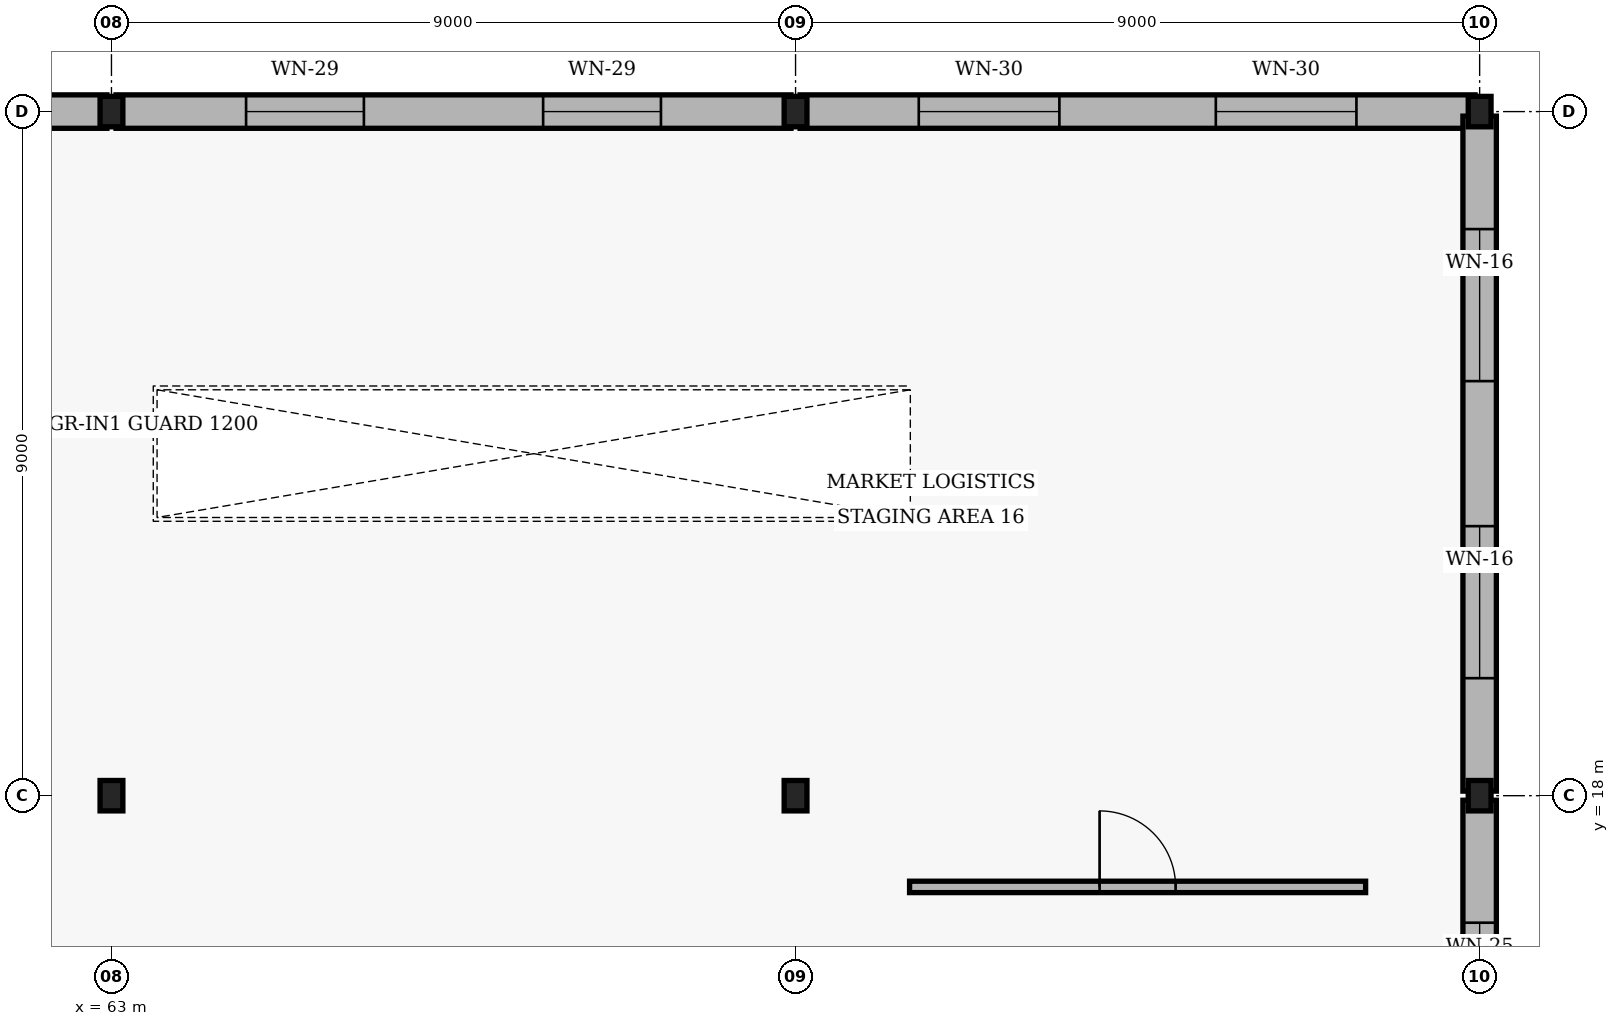
"""IFC4 building model, lengths in metres.
Left out: names, types, materials, properties, quantities, classifications, styles, units other than length and angle.
Written with IfcOpenShell. Run it as: python <this file> out.ifc"""

import sys

from ifc_helpers import new_model, si_unit, direction, frame, frame_2d, origin, origin_2d, place, context, subcontext, project, spatial, rectangle, i_section, extrude, element, fill, save


model = new_model("IFC4")
c1 = context("Model", 3, precision=1e-05, world=origin(), true_north=direction((0.0, 1.0)))
c2 = subcontext(c1, "Body", "Model", "MODEL_VIEW")
j1 = project(units=[si_unit("LENGTHUNIT", "METRE"), si_unit("PLANEANGLEUNIT", "RADIAN")], contexts=[c1])
p1 = place(None, origin())
s1 = spatial("IfcSite", under=j1, at=p1, CompositionType="ELEMENT")
p2 = place(p1, origin())
s2 = spatial("IfcBuilding", under=s1, at=p2, CompositionType="ELEMENT")
p3 = place(p2, frame((0.0, 0.0, 5.4)))
s3 = spatial("IfcBuildingStorey", under=s2, at=p3, CompositionType="ELEMENT", Elevation=5.4)
for number, where, z_axis, x_axis in (
    (1, (63.0, 18.0, 0.0), (0.0, 0.0, 1.0), (1.0, 0.0, 0.0)),
    (2, (63.0, 27.0, 0.0), (0.0, 0.0, 1.0), (1.0, 0.0, 0.0)),
    (3, (72.0, 18.0, 0.0), (0.0, 0.0, 1.0), (1.0, 0.0, 0.0)),
    (4, (72.0, 27.0, 0.0), (0.0, 0.0, 1.0), (1.0, 0.0, 0.0)),
    (5, (81.0, 18.0, 0.0), (0.0, 0.0, 1.0), (1.0, 0.0, 0.0)),
    (6, (81.0, 27.0, 0.0), (0.0, 0.0, 1.0), (1.0, 0.0, 0.0)),
):
    element("IfcColumn", number, at=place(p3, frame(where, z_axis=z_axis, x_axis=x_axis)), inside=s3, PredefinedType="COLUMN", context=c2, shape_type="SweptSolid", body=[
        extrude(i_section(OverallWidth=0.3, OverallDepth=0.4, WebThickness=0.013, FlangeThickness=0.024, FilletRadius=0.027, at=origin_2d()), origin(), (0.0, 0.0, 1.0), 4.2),
    ])
p4 = place(p3, frame((54.06, 27.0, 0.0), z_axis=(0.0, 0.0, 1.0), x_axis=(1.0, 0.0, 0.0)))
e7 = element("IfcWall", 7, at=p4, inside=s3, PredefinedType="SOLIDWALL", context=c2, shape_type="SweptSolid", body=[
    extrude(rectangle(XDim=8.88, YDim=0.44, at=frame_2d((4.44, 0.0))), origin(), (0.0, 0.0, 1.0), 3.5),
])
p5 = place(p4, frame((1.286, 0.0, 0.9)))
e8 = element("IfcOpeningElement", 8, at=p5, cuts=e7, PredefinedType="OPENING", context=c2, shape_type="SweptSolid", body=[
    extrude(rectangle(XDim=2.4, YDim=2.1, at=frame_2d((1.2, 1.05))), frame((0.0, 0.23, 0.0), z_axis=(0.0, -1.0, 0.0), x_axis=(1.0, 0.0, 0.0)), (0.0, 0.0, 1.0), 0.46),
])
p6 = place(p4, frame((5.194, 0.0, 0.9)))
e9 = element("IfcOpeningElement", 9, at=p6, cuts=e7, PredefinedType="OPENING", context=c2, shape_type="SweptSolid", body=[
    extrude(rectangle(XDim=2.4, YDim=2.1, at=frame_2d((1.2, 1.05))), frame((0.0, 0.23, 0.0), z_axis=(0.0, -1.0, 0.0), x_axis=(1.0, 0.0, 0.0)), (0.0, 0.0, 1.0), 0.46),
])
p7 = place(p3, frame((63.06, 27.0, 0.0), z_axis=(0.0, 0.0, 1.0), x_axis=(1.0, 0.0, 0.0)))
e10 = element("IfcWall", 10, at=p7, inside=s3, PredefinedType="SOLIDWALL", context=c2, shape_type="SweptSolid", body=[
    extrude(rectangle(XDim=8.88, YDim=0.44, at=frame_2d((4.44, 0.0))), origin(), (0.0, 0.0, 1.0), 3.5),
])
p8 = place(p7, frame((1.711, 0.0, 0.9)))
e11 = element("IfcOpeningElement", 11, at=p8, cuts=e10, PredefinedType="OPENING", context=c2, shape_type="SweptSolid", body=[
    extrude(rectangle(XDim=1.55, YDim=1.95, at=frame_2d((0.775, 0.975))), frame((0.0, 0.23, 0.0), z_axis=(0.0, -1.0, 0.0), x_axis=(1.0, 0.0, 0.0)), (0.0, 0.0, 1.0), 0.46),
])
p9 = place(p7, frame((5.619, 0.0, 0.9)))
e12 = element("IfcOpeningElement", 12, at=p9, cuts=e10, PredefinedType="OPENING", context=c2, shape_type="SweptSolid", body=[
    extrude(rectangle(XDim=1.55, YDim=1.95, at=frame_2d((0.775, 0.975))), frame((0.0, 0.23, 0.0), z_axis=(0.0, -1.0, 0.0), x_axis=(1.0, 0.0, 0.0)), (0.0, 0.0, 1.0), 0.46),
])
p10 = place(p3, frame((72.06, 27.0, 0.0), z_axis=(0.0, 0.0, 1.0), x_axis=(1.0, 0.0, 0.0)))
e13 = element("IfcWall", 13, at=p10, inside=s3, PredefinedType="SOLIDWALL", context=c2, shape_type="SweptSolid", body=[
    extrude(rectangle(XDim=8.88, YDim=0.44, at=frame_2d((4.44, 0.0))), origin(), (0.0, 0.0, 1.0), 3.5),
])
p11 = place(p10, frame((1.561, 0.0, 0.9)))
e14 = element("IfcOpeningElement", 14, at=p11, cuts=e13, PredefinedType="OPENING", context=c2, shape_type="SweptSolid", body=[
    extrude(rectangle(XDim=1.85, YDim=2.05, at=frame_2d((0.925, 1.025))), frame((0.0, 0.23, 0.0), z_axis=(0.0, -1.0, 0.0), x_axis=(1.0, 0.0, 0.0)), (0.0, 0.0, 1.0), 0.46),
])
p12 = place(p10, frame((5.469, 0.0, 0.9)))
e15 = element("IfcOpeningElement", 15, at=p12, cuts=e13, PredefinedType="OPENING", context=c2, shape_type="SweptSolid", body=[
    extrude(rectangle(XDim=1.85, YDim=2.05, at=frame_2d((0.925, 1.025))), frame((0.0, 0.23, 0.0), z_axis=(0.0, -1.0, 0.0), x_axis=(1.0, 0.0, 0.0)), (0.0, 0.0, 1.0), 0.46),
])
p13 = place(p3, frame((81.0, 9.06, 0.0), z_axis=(0.0, 0.0, 1.0), x_axis=(0.0, 1.0, 0.0)))
e16 = element("IfcWall", 16, at=p13, inside=s3, PredefinedType="SOLIDWALL", context=c2, shape_type="SweptSolid", body=[
    extrude(rectangle(XDim=8.88, YDim=0.44, at=frame_2d((4.44, 0.0))), origin(), (0.0, 0.0, 1.0), 3.5),
])
p14 = place(p13, frame((1.611, 0.0, 0.9)))
e17 = element("IfcOpeningElement", 17, at=p14, cuts=e16, PredefinedType="OPENING", context=c2, shape_type="SweptSolid", body=[
    extrude(rectangle(XDim=1.75, YDim=2.25, at=frame_2d((0.875, 1.125))), frame((0.0, 0.23, 0.0), z_axis=(0.0, -1.0, 0.0), x_axis=(1.0, 0.0, 0.0)), (0.0, 0.0, 1.0), 0.46),
])
p15 = place(p13, frame((5.519, 0.0, 0.9)))
e18 = element("IfcOpeningElement", 18, at=p15, cuts=e16, PredefinedType="OPENING", context=c2, shape_type="SweptSolid", body=[
    extrude(rectangle(XDim=1.75, YDim=2.25, at=frame_2d((0.875, 1.125))), frame((0.0, 0.23, 0.0), z_axis=(0.0, -1.0, 0.0), x_axis=(1.0, 0.0, 0.0)), (0.0, 0.0, 1.0), 0.46),
])
p16 = place(p3, frame((81.0, 18.06, 0.0), z_axis=(0.0, 0.0, 1.0), x_axis=(0.0, 1.0, 0.0)))
e19 = element("IfcWall", 19, at=p16, inside=s3, PredefinedType="SOLIDWALL", context=c2, shape_type="SweptSolid", body=[
    extrude(rectangle(XDim=8.88, YDim=0.44, at=frame_2d((4.44, 0.0))), origin(), (0.0, 0.0, 1.0), 3.5),
])
p17 = place(p16, frame((1.486, 0.0, 0.9)))
e20 = element("IfcOpeningElement", 20, at=p17, cuts=e19, PredefinedType="OPENING", context=c2, shape_type="SweptSolid", body=[
    extrude(rectangle(XDim=2.0, YDim=2.4, at=frame_2d((1.0, 1.2))), frame((0.0, 0.23, 0.0), z_axis=(0.0, -1.0, 0.0), x_axis=(1.0, 0.0, 0.0)), (0.0, 0.0, 1.0), 0.46),
])
p18 = place(p16, frame((5.394, 0.0, 0.9)))
e21 = element("IfcOpeningElement", 21, at=p18, cuts=e19, PredefinedType="OPENING", context=c2, shape_type="SweptSolid", body=[
    extrude(rectangle(XDim=2.0, YDim=2.4, at=frame_2d((1.0, 1.2))), frame((0.0, 0.23, 0.0), z_axis=(0.0, -1.0, 0.0), x_axis=(1.0, 0.0, 0.0)), (0.0, 0.0, 1.0), 0.46),
])
p19 = place(p3, frame((73.5, 16.8, 0.0), z_axis=(0.0, 0.0, 1.0), x_axis=(1.0, 0.0, 0.0)))
e22 = element("IfcWall", 22, at=p19, inside=s3, PredefinedType="PARTITIONING", context=c2, shape_type="SweptSolid", body=[
    extrude(rectangle(XDim=6.0, YDim=0.15, at=frame_2d((3.0, 0.0))), origin(), (0.0, 0.0, 1.0), 3.2),
])
p20 = place(p19, frame((2.5, 0.0, 0.0)))
e23 = element("IfcOpeningElement", 23, at=p20, cuts=e22, PredefinedType="OPENING", context=c2, shape_type="SweptSolid", body=[
    extrude(rectangle(XDim=1.0, YDim=2.1, at=frame_2d((0.5, 1.05))), frame((0.0, 0.085, 0.0), z_axis=(0.0, -1.0, 0.0), x_axis=(1.0, 0.0, 0.0)), (0.0, 0.0, 1.0), 0.17),
])
p21 = place(p8, origin())
e24 = element("IfcWindow", 24, at=p21, inside=s3, PartitioningType="SINGLE_PANEL", PredefinedType="WINDOW", context=c2, shape_type="SweptSolid", body=[
    extrude(rectangle(XDim=1.55, YDim=1.95, at=frame_2d((0.775, 0.975))), frame((0.0, 0.03, 0.0), z_axis=(0.0, -1.0, 0.0), x_axis=(1.0, 0.0, 0.0)), (0.0, 0.0, 1.0), 0.06),
])
fill(e11, e24)
p22 = place(p9, origin())
e25 = element("IfcWindow", 25, at=p22, inside=s3, PartitioningType="SINGLE_PANEL", PredefinedType="WINDOW", context=c2, shape_type="SweptSolid", body=[
    extrude(rectangle(XDim=1.55, YDim=1.95, at=frame_2d((0.775, 0.975))), frame((0.0, 0.03, 0.0), z_axis=(0.0, -1.0, 0.0), x_axis=(1.0, 0.0, 0.0)), (0.0, 0.0, 1.0), 0.06),
])
fill(e12, e25)
p23 = place(p11, origin())
e26 = element("IfcWindow", 26, at=p23, inside=s3, PartitioningType="SINGLE_PANEL", PredefinedType="WINDOW", context=c2, shape_type="SweptSolid", body=[
    extrude(rectangle(XDim=1.85, YDim=2.05, at=frame_2d((0.925, 1.025))), frame((0.0, 0.03, 0.0), z_axis=(0.0, -1.0, 0.0), x_axis=(1.0, 0.0, 0.0)), (0.0, 0.0, 1.0), 0.06),
])
fill(e14, e26)
p24 = place(p12, origin())
e27 = element("IfcWindow", 27, at=p24, inside=s3, PartitioningType="SINGLE_PANEL", PredefinedType="WINDOW", context=c2, shape_type="SweptSolid", body=[
    extrude(rectangle(XDim=1.85, YDim=2.05, at=frame_2d((0.925, 1.025))), frame((0.0, 0.03, 0.0), z_axis=(0.0, -1.0, 0.0), x_axis=(1.0, 0.0, 0.0)), (0.0, 0.0, 1.0), 0.06),
])
fill(e15, e27)
p25 = place(p15, origin())
e28 = element("IfcWindow", 28, at=p25, inside=s3, PartitioningType="SINGLE_PANEL", PredefinedType="WINDOW", context=c2, shape_type="SweptSolid", body=[
    extrude(rectangle(XDim=1.75, YDim=2.25, at=frame_2d((0.875, 1.125))), frame((0.0, 0.03, 0.0), z_axis=(0.0, -1.0, 0.0), x_axis=(1.0, 0.0, 0.0)), (0.0, 0.0, 1.0), 0.06),
])
fill(e18, e28)
p26 = place(p17, origin())
e29 = element("IfcWindow", 29, at=p26, inside=s3, PartitioningType="SINGLE_PANEL", PredefinedType="WINDOW", context=c2, shape_type="SweptSolid", body=[
    extrude(rectangle(XDim=2.0, YDim=2.4, at=frame_2d((1.0, 1.2))), frame((0.0, 0.03, 0.0), z_axis=(0.0, -1.0, 0.0), x_axis=(1.0, 0.0, 0.0)), (0.0, 0.0, 1.0), 0.06),
])
fill(e20, e29)
p27 = place(p18, origin())
e30 = element("IfcWindow", 30, at=p27, inside=s3, PartitioningType="SINGLE_PANEL", PredefinedType="WINDOW", context=c2, shape_type="SweptSolid", body=[
    extrude(rectangle(XDim=2.0, YDim=2.4, at=frame_2d((1.0, 1.2))), frame((0.0, 0.03, 0.0), z_axis=(0.0, -1.0, 0.0), x_axis=(1.0, 0.0, 0.0)), (0.0, 0.0, 1.0), 0.06),
])
fill(e21, e30)
p28 = place(p20, origin())
e31 = element("IfcDoor", 31, at=p28, inside=s3, OperationType="SINGLE_SWING_LEFT", PredefinedType="DOOR", context=c2, shape_type="SweptSolid", body=[
    extrude(rectangle(XDim=1.0, YDim=2.1, at=frame_2d((0.5, 1.05))), frame((0.0, 0.025, 0.0), z_axis=(0.0, -1.0, 0.0), x_axis=(1.0, 0.0, 0.0)), (0.0, 0.0, 1.0), 0.05),
])
fill(e23, e31)
save(model, sys.argv[1])
